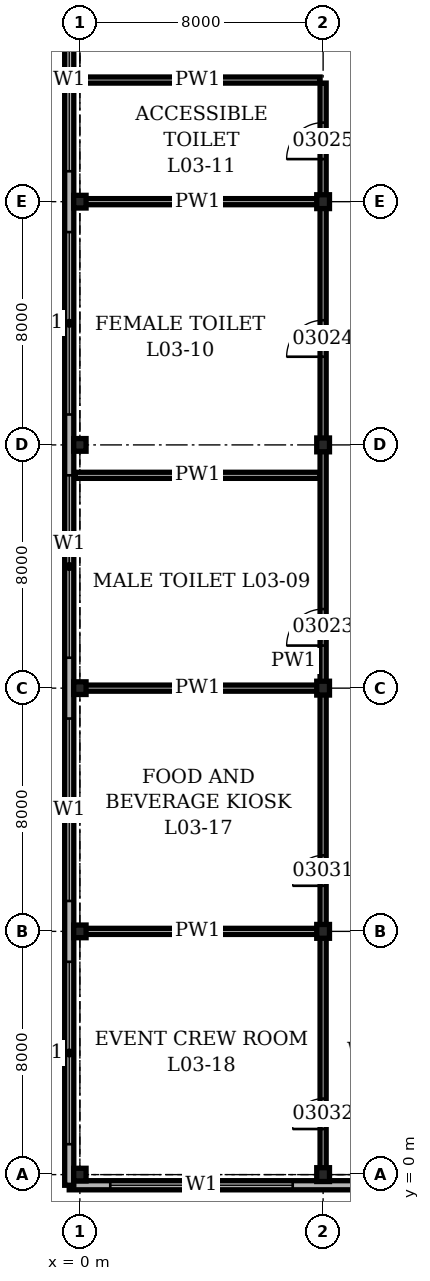
"""IFC4 building model, lengths in metres.
Left out: names, types, materials, properties, quantities, classifications, styles, units other than length and angle.
Written with IfcOpenShell. Run it as: python <this file> out.ifc"""

import sys

from ifc_helpers import new_model, si_unit, direction, frame, frame_2d, origin, origin_2d, place, context, subcontext, project, spatial, rectangle, i_section, extrude, element, fill, save


model = new_model("IFC4")
c1 = context("Model", 3, precision=1e-05, world=origin(), true_north=direction((0.0, 1.0)))
c2 = subcontext(c1, "Body", "Model", "MODEL_VIEW")
j1 = project(units=[si_unit("LENGTHUNIT", "METRE"), si_unit("PLANEANGLEUNIT", "RADIAN")], contexts=[c1])
p1 = place(None, origin())
s1 = spatial("IfcSite", under=j1, at=p1, CompositionType="ELEMENT")
p2 = place(p1, origin())
s2 = spatial("IfcBuilding", under=s1, at=p2, CompositionType="ELEMENT")
p3 = place(p2, frame((0.0, 0.0, 14.9)))
s3 = spatial("IfcBuildingStorey", under=s2, at=p3, CompositionType="ELEMENT", Elevation=14.9)
for number, where, z_axis, x_axis in (
    (1, (0.0, 0.0, 0.0), (0.0, 0.0, 1.0), (1.0, 0.0, 0.0)),
    (2, (0.0, 8.0, 0.0), (0.0, 0.0, 1.0), (1.0, 0.0, 0.0)),
    (3, (0.0, 16.0, 0.0), (0.0, 0.0, 1.0), (1.0, 0.0, 0.0)),
    (4, (0.0, 24.0, 0.0), (0.0, 0.0, 1.0), (1.0, 0.0, 0.0)),
    (5, (0.0, 32.0, 0.0), (0.0, 0.0, 1.0), (1.0, 0.0, 0.0)),
):
    element("IfcColumn", number, at=place(p3, frame(where, z_axis=z_axis, x_axis=x_axis)), inside=s3, PredefinedType="COLUMN", context=c2, shape_type="SweptSolid", body=[
        extrude(i_section(OverallWidth=0.406, OverallDepth=0.417, WebThickness=0.03, FlangeThickness=0.048, at=origin_2d()), origin(), (0.0, 0.0, 1.0), 5.0),
    ])
for number, where, z_axis, x_axis in (
    (6, (8.0, 0.0, 0.0), (0.0, 0.0, 1.0), (1.0, 0.0, 0.0)),
    (7, (8.0, 8.0, 0.0), (0.0, 0.0, 1.0), (1.0, 0.0, 0.0)),
    (8, (8.0, 16.0, 0.0), (0.0, 0.0, 1.0), (1.0, 0.0, 0.0)),
    (9, (8.0, 24.0, 0.0), (0.0, 0.0, 1.0), (1.0, 0.0, 0.0)),
    (10, (8.0, 32.0, 0.0), (0.0, 0.0, 1.0), (1.0, 0.0, 0.0)),
):
    element("IfcColumn", number, at=place(p3, frame(where, z_axis=z_axis, x_axis=x_axis)), inside=s3, PredefinedType="COLUMN", context=c2, shape_type="SweptSolid", body=[
        extrude(i_section(OverallWidth=0.419, OverallDepth=0.455, WebThickness=0.042, FlangeThickness=0.068, at=origin_2d()), origin(), (0.0, 0.0, 1.0), 5.0),
    ])
p4 = place(p3, frame((-0.35, -0.35, 0.0), z_axis=(0.0, 0.0, 1.0), x_axis=(1.0, 0.0, 0.0)))
e11 = element("IfcWall", 11, at=p4, inside=s3, PredefinedType="SOLIDWALL", context=c2, shape_type="SweptSolid", body=[
    extrude(rectangle(XDim=112.7, YDim=0.3, at=frame_2d((56.35, 0.0))), origin(), (0.0, 0.0, 1.0), 5.0),
])
p5 = place(p4, frame((1.35, 0.0, 1.0)))
e12 = element("IfcOpeningElement", 12, at=p5, cuts=e11, PredefinedType="OPENING", context=c2, shape_type="SweptSolid", body=[
    extrude(rectangle(XDim=6.0, YDim=1.5, at=frame_2d((3.0, 0.75))), frame((0.0, 0.16, 0.0), z_axis=(0.0, -1.0, 0.0), x_axis=(1.0, 0.0, 0.0)), (0.0, 0.0, 1.0), 0.32),
])
p6 = place(p4, frame((9.35, 0.0, 1.0)))
e13 = element("IfcOpeningElement", 13, at=p6, cuts=e11, PredefinedType="OPENING", context=c2, shape_type="SweptSolid", body=[
    extrude(rectangle(XDim=6.0, YDim=1.5, at=frame_2d((3.0, 0.75))), frame((0.0, 0.16, 0.0), z_axis=(0.0, -1.0, 0.0), x_axis=(1.0, 0.0, 0.0)), (0.0, 0.0, 1.0), 0.32),
])
p7 = place(p4, frame((17.35, 0.0, 1.0)))
e14 = element("IfcOpeningElement", 14, at=p7, cuts=e11, PredefinedType="OPENING", context=c2, shape_type="SweptSolid", body=[
    extrude(rectangle(XDim=6.0, YDim=1.5, at=frame_2d((3.0, 0.75))), frame((0.0, 0.16, 0.0), z_axis=(0.0, -1.0, 0.0), x_axis=(1.0, 0.0, 0.0)), (0.0, 0.0, 1.0), 0.32),
])
p8 = place(p4, frame((25.35, 0.0, 1.0)))
e15 = element("IfcOpeningElement", 15, at=p8, cuts=e11, PredefinedType="OPENING", context=c2, shape_type="SweptSolid", body=[
    extrude(rectangle(XDim=6.0, YDim=1.5, at=frame_2d((3.0, 0.75))), frame((0.0, 0.16, 0.0), z_axis=(0.0, -1.0, 0.0), x_axis=(1.0, 0.0, 0.0)), (0.0, 0.0, 1.0), 0.32),
])
p9 = place(p4, frame((33.35, 0.0, 1.0)))
e16 = element("IfcOpeningElement", 16, at=p9, cuts=e11, PredefinedType="OPENING", context=c2, shape_type="SweptSolid", body=[
    extrude(rectangle(XDim=6.0, YDim=1.5, at=frame_2d((3.0, 0.75))), frame((0.0, 0.16, 0.0), z_axis=(0.0, -1.0, 0.0), x_axis=(1.0, 0.0, 0.0)), (0.0, 0.0, 1.0), 0.32),
])
p10 = place(p4, frame((41.35, 0.0, 1.0)))
e17 = element("IfcOpeningElement", 17, at=p10, cuts=e11, PredefinedType="OPENING", context=c2, shape_type="SweptSolid", body=[
    extrude(rectangle(XDim=6.0, YDim=1.5, at=frame_2d((3.0, 0.75))), frame((0.0, 0.16, 0.0), z_axis=(0.0, -1.0, 0.0), x_axis=(1.0, 0.0, 0.0)), (0.0, 0.0, 1.0), 0.32),
])
p11 = place(p4, frame((49.35, 0.0, 1.0)))
e18 = element("IfcOpeningElement", 18, at=p11, cuts=e11, PredefinedType="OPENING", context=c2, shape_type="SweptSolid", body=[
    extrude(rectangle(XDim=6.0, YDim=1.5, at=frame_2d((3.0, 0.75))), frame((0.0, 0.16, 0.0), z_axis=(0.0, -1.0, 0.0), x_axis=(1.0, 0.0, 0.0)), (0.0, 0.0, 1.0), 0.32),
])
p12 = place(p4, frame((57.35, 0.0, 1.0)))
e19 = element("IfcOpeningElement", 19, at=p12, cuts=e11, PredefinedType="OPENING", context=c2, shape_type="SweptSolid", body=[
    extrude(rectangle(XDim=6.0, YDim=1.5, at=frame_2d((3.0, 0.75))), frame((0.0, 0.16, 0.0), z_axis=(0.0, -1.0, 0.0), x_axis=(1.0, 0.0, 0.0)), (0.0, 0.0, 1.0), 0.32),
])
p13 = place(p4, frame((65.35, 0.0, 1.0)))
e20 = element("IfcOpeningElement", 20, at=p13, cuts=e11, PredefinedType="OPENING", context=c2, shape_type="SweptSolid", body=[
    extrude(rectangle(XDim=6.0, YDim=1.5, at=frame_2d((3.0, 0.75))), frame((0.0, 0.16, 0.0), z_axis=(0.0, -1.0, 0.0), x_axis=(1.0, 0.0, 0.0)), (0.0, 0.0, 1.0), 0.32),
])
p14 = place(p4, frame((73.35, 0.0, 1.0)))
e21 = element("IfcOpeningElement", 21, at=p14, cuts=e11, PredefinedType="OPENING", context=c2, shape_type="SweptSolid", body=[
    extrude(rectangle(XDim=6.0, YDim=1.5, at=frame_2d((3.0, 0.75))), frame((0.0, 0.16, 0.0), z_axis=(0.0, -1.0, 0.0), x_axis=(1.0, 0.0, 0.0)), (0.0, 0.0, 1.0), 0.32),
])
p15 = place(p4, frame((81.35, 0.0, 1.0)))
e22 = element("IfcOpeningElement", 22, at=p15, cuts=e11, PredefinedType="OPENING", context=c2, shape_type="SweptSolid", body=[
    extrude(rectangle(XDim=6.0, YDim=1.5, at=frame_2d((3.0, 0.75))), frame((0.0, 0.16, 0.0), z_axis=(0.0, -1.0, 0.0), x_axis=(1.0, 0.0, 0.0)), (0.0, 0.0, 1.0), 0.32),
])
p16 = place(p4, frame((89.35, 0.0, 1.0)))
e23 = element("IfcOpeningElement", 23, at=p16, cuts=e11, PredefinedType="OPENING", context=c2, shape_type="SweptSolid", body=[
    extrude(rectangle(XDim=6.0, YDim=1.5, at=frame_2d((3.0, 0.75))), frame((0.0, 0.16, 0.0), z_axis=(0.0, -1.0, 0.0), x_axis=(1.0, 0.0, 0.0)), (0.0, 0.0, 1.0), 0.32),
])
p17 = place(p4, frame((97.35, 0.0, 1.0)))
e24 = element("IfcOpeningElement", 24, at=p17, cuts=e11, PredefinedType="OPENING", context=c2, shape_type="SweptSolid", body=[
    extrude(rectangle(XDim=6.0, YDim=1.5, at=frame_2d((3.0, 0.75))), frame((0.0, 0.16, 0.0), z_axis=(0.0, -1.0, 0.0), x_axis=(1.0, 0.0, 0.0)), (0.0, 0.0, 1.0), 0.32),
])
p18 = place(p4, frame((105.35, 0.0, 1.0)))
e25 = element("IfcOpeningElement", 25, at=p18, cuts=e11, PredefinedType="OPENING", context=c2, shape_type="SweptSolid", body=[
    extrude(rectangle(XDim=6.0, YDim=1.5, at=frame_2d((3.0, 0.75))), frame((0.0, 0.16, 0.0), z_axis=(0.0, -1.0, 0.0), x_axis=(1.0, 0.0, 0.0)), (0.0, 0.0, 1.0), 0.32),
])
p19 = place(p3, frame((-0.35, 112.35, 0.0), z_axis=(0.0, 0.0, 1.0), x_axis=(0.0, -1.0, 0.0)))
e26 = element("IfcWall", 26, at=p19, inside=s3, PredefinedType="SOLIDWALL", context=c2, shape_type="SweptSolid", body=[
    extrude(rectangle(XDim=112.7, YDim=0.3, at=frame_2d((56.35, 0.0))), origin(), (0.0, 0.0, 1.0), 5.0),
])
p20 = place(p19, frame((1.35, 0.0, 1.0)))
e27 = element("IfcOpeningElement", 27, at=p20, cuts=e26, PredefinedType="OPENING", context=c2, shape_type="SweptSolid", body=[
    extrude(rectangle(XDim=6.0, YDim=1.5, at=frame_2d((3.0, 0.75))), frame((0.0, 0.16, 0.0), z_axis=(0.0, -1.0, 0.0), x_axis=(1.0, 0.0, 0.0)), (0.0, 0.0, 1.0), 0.32),
])
p21 = place(p19, frame((9.35, 0.0, 1.0)))
e28 = element("IfcOpeningElement", 28, at=p21, cuts=e26, PredefinedType="OPENING", context=c2, shape_type="SweptSolid", body=[
    extrude(rectangle(XDim=6.0, YDim=1.5, at=frame_2d((3.0, 0.75))), frame((0.0, 0.16, 0.0), z_axis=(0.0, -1.0, 0.0), x_axis=(1.0, 0.0, 0.0)), (0.0, 0.0, 1.0), 0.32),
])
p22 = place(p19, frame((17.35, 0.0, 1.0)))
e29 = element("IfcOpeningElement", 29, at=p22, cuts=e26, PredefinedType="OPENING", context=c2, shape_type="SweptSolid", body=[
    extrude(rectangle(XDim=6.0, YDim=1.5, at=frame_2d((3.0, 0.75))), frame((0.0, 0.16, 0.0), z_axis=(0.0, -1.0, 0.0), x_axis=(1.0, 0.0, 0.0)), (0.0, 0.0, 1.0), 0.32),
])
p23 = place(p19, frame((25.35, 0.0, 1.0)))
e30 = element("IfcOpeningElement", 30, at=p23, cuts=e26, PredefinedType="OPENING", context=c2, shape_type="SweptSolid", body=[
    extrude(rectangle(XDim=6.0, YDim=1.5, at=frame_2d((3.0, 0.75))), frame((0.0, 0.16, 0.0), z_axis=(0.0, -1.0, 0.0), x_axis=(1.0, 0.0, 0.0)), (0.0, 0.0, 1.0), 0.32),
])
p24 = place(p19, frame((33.35, 0.0, 1.0)))
e31 = element("IfcOpeningElement", 31, at=p24, cuts=e26, PredefinedType="OPENING", context=c2, shape_type="SweptSolid", body=[
    extrude(rectangle(XDim=6.0, YDim=1.5, at=frame_2d((3.0, 0.75))), frame((0.0, 0.16, 0.0), z_axis=(0.0, -1.0, 0.0), x_axis=(1.0, 0.0, 0.0)), (0.0, 0.0, 1.0), 0.32),
])
p25 = place(p19, frame((41.35, 0.0, 1.0)))
e32 = element("IfcOpeningElement", 32, at=p25, cuts=e26, PredefinedType="OPENING", context=c2, shape_type="SweptSolid", body=[
    extrude(rectangle(XDim=6.0, YDim=1.5, at=frame_2d((3.0, 0.75))), frame((0.0, 0.16, 0.0), z_axis=(0.0, -1.0, 0.0), x_axis=(1.0, 0.0, 0.0)), (0.0, 0.0, 1.0), 0.32),
])
p26 = place(p19, frame((49.35, 0.0, 1.0)))
e33 = element("IfcOpeningElement", 33, at=p26, cuts=e26, PredefinedType="OPENING", context=c2, shape_type="SweptSolid", body=[
    extrude(rectangle(XDim=6.0, YDim=1.5, at=frame_2d((3.0, 0.75))), frame((0.0, 0.16, 0.0), z_axis=(0.0, -1.0, 0.0), x_axis=(1.0, 0.0, 0.0)), (0.0, 0.0, 1.0), 0.32),
])
p27 = place(p19, frame((57.35, 0.0, 1.0)))
e34 = element("IfcOpeningElement", 34, at=p27, cuts=e26, PredefinedType="OPENING", context=c2, shape_type="SweptSolid", body=[
    extrude(rectangle(XDim=6.0, YDim=1.5, at=frame_2d((3.0, 0.75))), frame((0.0, 0.16, 0.0), z_axis=(0.0, -1.0, 0.0), x_axis=(1.0, 0.0, 0.0)), (0.0, 0.0, 1.0), 0.32),
])
p28 = place(p19, frame((65.35, 0.0, 1.0)))
e35 = element("IfcOpeningElement", 35, at=p28, cuts=e26, PredefinedType="OPENING", context=c2, shape_type="SweptSolid", body=[
    extrude(rectangle(XDim=6.0, YDim=1.5, at=frame_2d((3.0, 0.75))), frame((0.0, 0.16, 0.0), z_axis=(0.0, -1.0, 0.0), x_axis=(1.0, 0.0, 0.0)), (0.0, 0.0, 1.0), 0.32),
])
p29 = place(p19, frame((73.35, 0.0, 1.0)))
e36 = element("IfcOpeningElement", 36, at=p29, cuts=e26, PredefinedType="OPENING", context=c2, shape_type="SweptSolid", body=[
    extrude(rectangle(XDim=6.0, YDim=1.5, at=frame_2d((3.0, 0.75))), frame((0.0, 0.16, 0.0), z_axis=(0.0, -1.0, 0.0), x_axis=(1.0, 0.0, 0.0)), (0.0, 0.0, 1.0), 0.32),
])
p30 = place(p19, frame((81.35, 0.0, 1.0)))
e37 = element("IfcOpeningElement", 37, at=p30, cuts=e26, PredefinedType="OPENING", context=c2, shape_type="SweptSolid", body=[
    extrude(rectangle(XDim=6.0, YDim=1.5, at=frame_2d((3.0, 0.75))), frame((0.0, 0.16, 0.0), z_axis=(0.0, -1.0, 0.0), x_axis=(1.0, 0.0, 0.0)), (0.0, 0.0, 1.0), 0.32),
])
p31 = place(p19, frame((89.35, 0.0, 1.0)))
e38 = element("IfcOpeningElement", 38, at=p31, cuts=e26, PredefinedType="OPENING", context=c2, shape_type="SweptSolid", body=[
    extrude(rectangle(XDim=6.0, YDim=1.5, at=frame_2d((3.0, 0.75))), frame((0.0, 0.16, 0.0), z_axis=(0.0, -1.0, 0.0), x_axis=(1.0, 0.0, 0.0)), (0.0, 0.0, 1.0), 0.32),
])
p32 = place(p19, frame((97.35, 0.0, 1.0)))
e39 = element("IfcOpeningElement", 39, at=p32, cuts=e26, PredefinedType="OPENING", context=c2, shape_type="SweptSolid", body=[
    extrude(rectangle(XDim=6.0, YDim=1.5, at=frame_2d((3.0, 0.75))), frame((0.0, 0.16, 0.0), z_axis=(0.0, -1.0, 0.0), x_axis=(1.0, 0.0, 0.0)), (0.0, 0.0, 1.0), 0.32),
])
p33 = place(p19, frame((105.35, 0.0, 1.0)))
e40 = element("IfcOpeningElement", 40, at=p33, cuts=e26, PredefinedType="OPENING", context=c2, shape_type="SweptSolid", body=[
    extrude(rectangle(XDim=6.0, YDim=1.5, at=frame_2d((3.0, 0.75))), frame((0.0, 0.16, 0.0), z_axis=(0.0, -1.0, 0.0), x_axis=(1.0, 0.0, 0.0)), (0.0, 0.0, 1.0), 0.32),
])
for number, where, z_axis, x_axis in (
    (41, (-0.15, 8.0, 0.0), (0.0, 0.0, 1.0), (1.0, 0.0, 0.0)),
    (42, (-0.15, 16.0, 0.0), (0.0, 0.0, 1.0), (1.0, 0.0, 0.0)),
):
    element("IfcWall", number, at=place(p3, frame(where, z_axis=z_axis, x_axis=x_axis)), inside=s3, PredefinedType="PARTITIONING", context=c2, shape_type="SweptSolid", body=[
        extrude(rectangle(XDim=8.05, YDim=0.2, at=frame_2d((4.025, 0.0))), origin(), (0.0, 0.0, 1.0), 4.028),
    ])
p34 = place(p3, frame((-0.15, 23.0, 0.0), z_axis=(0.0, 0.0, 1.0), x_axis=(1.0, 0.0, 0.0)))
e43 = element("IfcWall", 43, at=p34, inside=s3, PredefinedType="PARTITIONING", context=c2, shape_type="SweptSolid", body=[
    extrude(rectangle(XDim=8.05, YDim=0.2, at=frame_2d((4.025, 0.0))), origin(), (0.0, 0.0, 1.0), 4.8),
])
p35 = place(p3, frame((-0.15, 32.0, 0.0), z_axis=(0.0, 0.0, 1.0), x_axis=(1.0, 0.0, 0.0)))
e44 = element("IfcWall", 44, at=p35, inside=s3, PredefinedType="PARTITIONING", context=c2, shape_type="SweptSolid", body=[
    extrude(rectangle(XDim=8.05, YDim=0.2, at=frame_2d((4.025, 0.0))), origin(), (0.0, 0.0, 1.0), 4.028),
])
p36 = place(p3, frame((-0.15, 36.0, 0.0), z_axis=(0.0, 0.0, 1.0), x_axis=(1.0, 0.0, 0.0)))
e45 = element("IfcWall", 45, at=p36, inside=s3, PredefinedType="PARTITIONING", context=c2, shape_type="SweptSolid", body=[
    extrude(rectangle(XDim=8.05, YDim=0.2, at=frame_2d((4.025, 0.0))), origin(), (0.0, 0.0, 1.0), 4.8),
])
p37 = place(p3, frame((8.0, -0.15, 0.0), z_axis=(0.0, 0.0, 1.0), x_axis=(0.0, 1.0, 0.0)))
e46 = element("IfcWall", 46, at=p37, inside=s3, PredefinedType="PARTITIONING", context=c2, shape_type="SweptSolid", body=[
    extrude(rectangle(XDim=36.05, YDim=0.2, at=frame_2d((18.025, 0.0))), origin(), (0.0, 0.0, 1.0), 4.028),
])
p38 = place(p37, frame((17.55, 0.0, 0.0)))
e47 = element("IfcOpeningElement", 47, at=p38, cuts=e46, PredefinedType="OPENING", context=c2, shape_type="SweptSolid", body=[
    extrude(rectangle(XDim=1.2, YDim=2.1, at=frame_2d((0.6, 1.05))), frame((0.0, 0.11, 0.0), z_axis=(0.0, -1.0, 0.0), x_axis=(1.0, 0.0, 0.0)), (0.0, 0.0, 1.0), 0.22),
])
p39 = place(p37, frame((27.05, 0.0, 0.0)))
e48 = element("IfcOpeningElement", 48, at=p39, cuts=e46, PredefinedType="OPENING", context=c2, shape_type="SweptSolid", body=[
    extrude(rectangle(XDim=1.2, YDim=2.1, at=frame_2d((0.6, 1.05))), frame((0.0, 0.11, 0.0), z_axis=(0.0, -1.0, 0.0), x_axis=(1.0, 0.0, 0.0)), (0.0, 0.0, 1.0), 0.22),
])
p40 = place(p37, frame((33.55, 0.0, 0.0)))
e49 = element("IfcOpeningElement", 49, at=p40, cuts=e46, PredefinedType="OPENING", context=c2, shape_type="SweptSolid", body=[
    extrude(rectangle(XDim=1.2, YDim=2.1, at=frame_2d((0.6, 1.05))), frame((0.0, 0.11, 0.0), z_axis=(0.0, -1.0, 0.0), x_axis=(1.0, 0.0, 0.0)), (0.0, 0.0, 1.0), 0.22),
])
p41 = place(p37, frame((9.65, 0.0, 0.0)))
e50 = element("IfcOpeningElement", 50, at=p41, cuts=e46, PredefinedType="OPENING", context=c2, shape_type="SweptSolid", body=[
    extrude(rectangle(XDim=1.0, YDim=2.1, at=frame_2d((0.5, 1.05))), frame((0.0, 0.11, 0.0), z_axis=(0.0, -1.0, 0.0), x_axis=(1.0, 0.0, 0.0)), (0.0, 0.0, 1.0), 0.22),
])
p42 = place(p37, frame((1.65, 0.0, 0.0)))
e51 = element("IfcOpeningElement", 51, at=p42, cuts=e46, PredefinedType="OPENING", context=c2, shape_type="SweptSolid", body=[
    extrude(rectangle(XDim=1.0, YDim=2.1, at=frame_2d((0.5, 1.05))), frame((0.0, 0.11, 0.0), z_axis=(0.0, -1.0, 0.0), x_axis=(1.0, 0.0, 0.0)), (0.0, 0.0, 1.0), 0.22),
])
p43 = place(p5, origin())
e52 = element("IfcWindow", 52, at=p43, inside=s3, PartitioningType="SINGLE_PANEL", PredefinedType="WINDOW", context=c2, shape_type="SweptSolid", body=[
    extrude(rectangle(XDim=6.0, YDim=1.5, at=frame_2d((3.0, 0.75))), frame((0.0, 0.03, 0.0), z_axis=(0.0, -1.0, 0.0), x_axis=(1.0, 0.0, 0.0)), (0.0, 0.0, 1.0), 0.06),
])
fill(e12, e52)
p44 = place(p29, origin())
e53 = element("IfcWindow", 53, at=p44, inside=s3, PartitioningType="SINGLE_PANEL", PredefinedType="WINDOW", context=c2, shape_type="SweptSolid", body=[
    extrude(rectangle(XDim=6.0, YDim=1.5, at=frame_2d((3.0, 0.75))), frame((0.0, 0.03, 0.0), z_axis=(0.0, -1.0, 0.0), x_axis=(1.0, 0.0, 0.0)), (0.0, 0.0, 1.0), 0.06),
])
fill(e36, e53)
p45 = place(p30, origin())
e54 = element("IfcWindow", 54, at=p45, inside=s3, PartitioningType="SINGLE_PANEL", PredefinedType="WINDOW", context=c2, shape_type="SweptSolid", body=[
    extrude(rectangle(XDim=6.0, YDim=1.5, at=frame_2d((3.0, 0.75))), frame((0.0, 0.03, 0.0), z_axis=(0.0, -1.0, 0.0), x_axis=(1.0, 0.0, 0.0)), (0.0, 0.0, 1.0), 0.06),
])
fill(e37, e54)
p46 = place(p31, origin())
e55 = element("IfcWindow", 55, at=p46, inside=s3, PartitioningType="SINGLE_PANEL", PredefinedType="WINDOW", context=c2, shape_type="SweptSolid", body=[
    extrude(rectangle(XDim=6.0, YDim=1.5, at=frame_2d((3.0, 0.75))), frame((0.0, 0.03, 0.0), z_axis=(0.0, -1.0, 0.0), x_axis=(1.0, 0.0, 0.0)), (0.0, 0.0, 1.0), 0.06),
])
fill(e38, e55)
p47 = place(p32, origin())
e56 = element("IfcWindow", 56, at=p47, inside=s3, PartitioningType="SINGLE_PANEL", PredefinedType="WINDOW", context=c2, shape_type="SweptSolid", body=[
    extrude(rectangle(XDim=6.0, YDim=1.5, at=frame_2d((3.0, 0.75))), frame((0.0, 0.03, 0.0), z_axis=(0.0, -1.0, 0.0), x_axis=(1.0, 0.0, 0.0)), (0.0, 0.0, 1.0), 0.06),
])
fill(e39, e56)
p48 = place(p33, origin())
e57 = element("IfcWindow", 57, at=p48, inside=s3, PartitioningType="SINGLE_PANEL", PredefinedType="WINDOW", context=c2, shape_type="SweptSolid", body=[
    extrude(rectangle(XDim=6.0, YDim=1.5, at=frame_2d((3.0, 0.75))), frame((0.0, 0.03, 0.0), z_axis=(0.0, -1.0, 0.0), x_axis=(1.0, 0.0, 0.0)), (0.0, 0.0, 1.0), 0.06),
])
fill(e40, e57)
p49 = place(p38, origin())
e58 = element("IfcDoor", 58, at=p49, inside=s3, OperationType="SINGLE_SWING_RIGHT", PredefinedType="DOOR", context=c2, shape_type="SweptSolid", body=[
    extrude(rectangle(XDim=1.2, YDim=2.1, at=frame_2d((0.6, 1.05))), frame((0.0, 0.1, 0.0), z_axis=(0.0, -1.0, 0.0), x_axis=(1.0, 0.0, 0.0)), (0.0, 0.0, 1.0), 0.199),
])
fill(e47, e58)
p50 = place(p39, origin())
e59 = element("IfcDoor", 59, at=p50, inside=s3, OperationType="SINGLE_SWING_RIGHT", PredefinedType="DOOR", context=c2, shape_type="SweptSolid", body=[
    extrude(rectangle(XDim=1.2, YDim=2.1, at=frame_2d((0.6, 1.05))), frame((0.0, 0.1, 0.0), z_axis=(0.0, -1.0, 0.0), x_axis=(1.0, 0.0, 0.0)), (0.0, 0.0, 1.0), 0.199),
])
fill(e48, e59)
p51 = place(p40, origin())
e60 = element("IfcDoor", 60, at=p51, inside=s3, OperationType="SINGLE_SWING_RIGHT", PredefinedType="DOOR", context=c2, shape_type="SweptSolid", body=[
    extrude(rectangle(XDim=1.2, YDim=2.1, at=frame_2d((0.6, 1.05))), frame((0.0, 0.1, 0.0), z_axis=(0.0, -1.0, 0.0), x_axis=(1.0, 0.0, 0.0)), (0.0, 0.0, 1.0), 0.199),
])
fill(e49, e60)
p52 = place(p41, origin())
e61 = element("IfcDoor", 61, at=p52, inside=s3, OperationType="SINGLE_SWING_LEFT", PredefinedType="DOOR", context=c2, shape_type="SweptSolid", body=[
    extrude(rectangle(XDim=1.0, YDim=2.1, at=frame_2d((0.5, 1.05))), frame((0.0, 0.1, 0.0), z_axis=(0.0, -1.0, 0.0), x_axis=(1.0, 0.0, 0.0)), (0.0, 0.0, 1.0), 0.199),
])
fill(e50, e61)
p53 = place(p42, origin())
e62 = element("IfcDoor", 62, at=p53, inside=s3, OperationType="SINGLE_SWING_LEFT", PredefinedType="DOOR", context=c2, shape_type="SweptSolid", body=[
    extrude(rectangle(XDim=1.0, YDim=2.1, at=frame_2d((0.5, 1.05))), frame((0.0, 0.1, 0.0), z_axis=(0.0, -1.0, 0.0), x_axis=(1.0, 0.0, 0.0)), (0.0, 0.0, 1.0), 0.199),
])
fill(e51, e62)
save(model, sys.argv[1])
